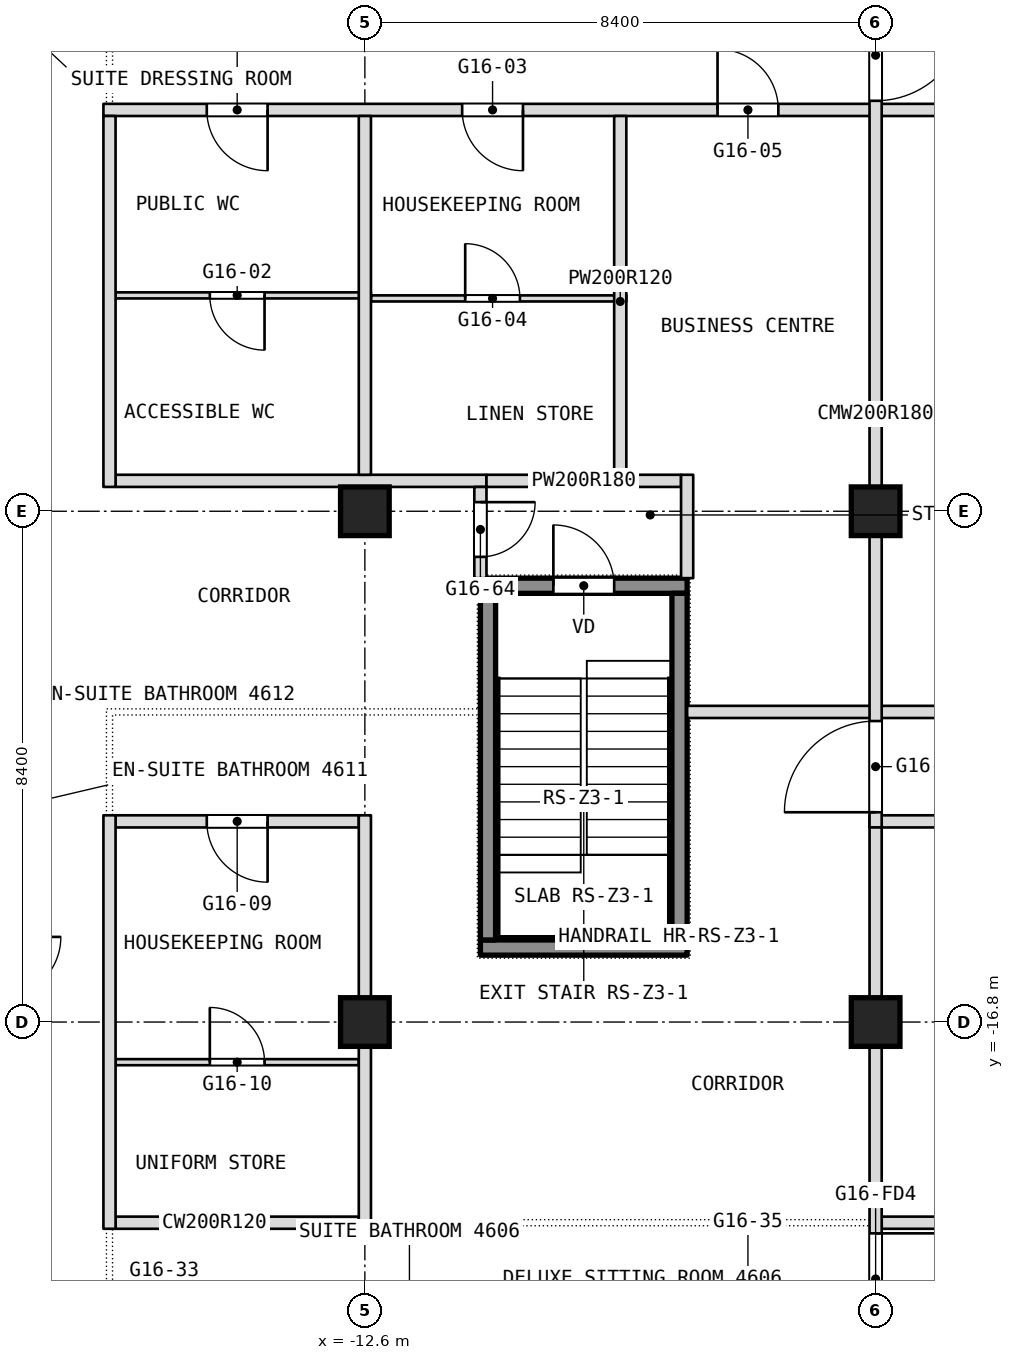
"""IFC4 building model, lengths in metres.
Left out: names, types, materials, properties, quantities, classifications, styles, units other than length and angle.
Written with IfcOpenShell. Run it as: python <this file> out.ifc"""

import sys

from ifc_helpers import new_model, si_unit, direction, frame, frame_2d, origin, origin_2d, place, context, subcontext, project, spatial, rectangle, extrude, element, fill, save


model = new_model("IFC4")
c1 = context("Model", 3, precision=1e-05, world=origin(), true_north=direction((0.0, 1.0)))
c2 = subcontext(c1, "Body", "Model", "MODEL_VIEW")
j1 = project(units=[si_unit("LENGTHUNIT", "METRE"), si_unit("PLANEANGLEUNIT", "RADIAN")], contexts=[c1])
p1 = place(None, origin())
s1 = spatial("IfcSite", under=j1, at=p1, CompositionType="ELEMENT")
p2 = place(p1, origin())
s2 = spatial("IfcBuilding", under=s1, at=p2, CompositionType="ELEMENT")
p3 = place(p2, frame((0.0, 0.0, 202.1)))
s3 = spatial("IfcBuildingStorey", under=s2, at=p3, CompositionType="ELEMENT", Elevation=202.1)
for number, where, z_axis, x_axis in (
    (1, (-12.6, -16.8, 0.0), (0.0, 0.0, 1.0), (1.0, 0.0, 0.0)),
    (2, (-12.6, -8.4, 0.0), (0.0, 0.0, 1.0), (1.0, 0.0, 0.0)),
    (3, (-4.2, -16.8, 0.0), (0.0, 0.0, 1.0), (1.0, 0.0, 0.0)),
    (4, (-4.2, -8.4, 0.0), (0.0, 0.0, 1.0), (1.0, 0.0, 0.0)),
):
    element("IfcColumn", number, at=place(p3, frame(where, z_axis=z_axis, x_axis=x_axis)), inside=s3, PredefinedType="COLUMN", context=c2, shape_type="SweptSolid", body=[
        extrude(rectangle(XDim=0.8, YDim=0.8, at=origin_2d()), origin(), (0.0, 0.0, 1.0), 3.6),
    ])
p4 = place(p3, frame((-16.7, -20.1, 0.0), z_axis=(0.0, 0.0, 1.0), x_axis=(1.0, 0.0, 0.0)))
e5 = element("IfcWall", 5, at=p4, inside=s3, PredefinedType="PARTITIONING", context=c2, shape_type="SweptSolid", body=[
    extrude(rectangle(XDim=4.0, YDim=0.2, at=frame_2d((2.0, 0.0))), origin(), (0.0, 0.0, 1.0), 3.34),
])
p5 = place(p3, frame((-4.1, -20.1, 0.0), z_axis=(0.0, 0.0, 1.0), x_axis=(1.0, 0.0, 0.0)))
e6 = element("IfcWall", 6, at=p5, inside=s3, PredefinedType="PARTITIONING", context=c2, shape_type="SweptSolid", body=[
    extrude(rectangle(XDim=20.8, YDim=0.2, at=frame_2d((10.4, 0.0))), origin(), (0.0, 0.0, 1.0), 3.34),
])
p6 = place(p3, frame((-16.7, -17.46, 0.0), z_axis=(0.0, 0.0, 1.0), x_axis=(1.0, 0.0, 0.0)))
e7 = element("IfcWall", 7, at=p6, inside=s3, PredefinedType="PARTITIONING", context=c2, shape_type="SweptSolid", body=[
    extrude(rectangle(XDim=4.0, YDim=0.1, at=frame_2d((2.0, 0.0))), origin(), (0.0, 0.0, 1.0), 3.34),
])
p7 = place(p6, frame((1.55, 0.0, 0.0)))
e8 = element("IfcOpeningElement", 8, at=p7, cuts=e7, PredefinedType="OPENING", context=c2, shape_type="SweptSolid", body=[
    extrude(rectangle(XDim=0.9, YDim=2.1, at=frame_2d((0.45, 1.05))), frame((0.0, 0.05, 0.0), z_axis=(0.0, -1.0, 0.0), x_axis=(1.0, 0.0, 0.0)), (0.0, 0.0, 1.0), 0.1),
])
p8 = place(p3, frame((-16.7, -13.5, 0.0), z_axis=(0.0, 0.0, 1.0), x_axis=(1.0, 0.0, 0.0)))
e9 = element("IfcWall", 9, at=p8, inside=s3, PredefinedType="PARTITIONING", context=c2, shape_type="SweptSolid", body=[
    extrude(rectangle(XDim=4.0, YDim=0.2, at=frame_2d((2.0, 0.0))), origin(), (0.0, 0.0, 1.0), 3.34),
])
p9 = place(p8, frame((1.5, 0.0, 0.0)))
e10 = element("IfcOpeningElement", 10, at=p9, cuts=e9, PredefinedType="OPENING", context=c2, shape_type="SweptSolid", body=[
    extrude(rectangle(XDim=1.0, YDim=2.1, at=frame_2d((0.5, 1.05))), frame((0.0, 0.1, 0.0), z_axis=(0.0, -1.0, 0.0), x_axis=(1.0, 0.0, 0.0)), (0.0, 0.0, 1.0), 0.2),
])
p10 = place(p3, frame((-4.3, -13.5, 0.0), z_axis=(0.0, 0.0, 1.0), x_axis=(1.0, 0.0, 0.0)))
e11 = element("IfcWall", 11, at=p10, inside=s3, PredefinedType="PARTITIONING", context=c2, shape_type="SweptSolid", body=[
    extrude(rectangle(XDim=10.0, YDim=0.2, at=frame_2d((5.0, 0.0))), origin(), (0.0, 0.0, 1.0), 3.34),
])
p11 = place(p10, frame((3.4, 0.0, 0.0)))
e12 = element("IfcOpeningElement", 12, at=p11, cuts=e11, PredefinedType="OPENING", context=c2, shape_type="SweptSolid", body=[
    extrude(rectangle(XDim=1.8, YDim=2.1, at=frame_2d((0.9, 1.05))), frame((0.0, 0.1, 0.0), z_axis=(0.0, -1.0, 0.0), x_axis=(1.0, 0.0, 0.0)), (0.0, 0.0, 1.0), 0.2),
])
p12 = place(p10, frame((8.85, 0.0, 0.0)))
e13 = element("IfcOpeningElement", 13, at=p12, cuts=e11, PredefinedType="OPENING", context=c2, shape_type="SweptSolid", body=[
    extrude(rectangle(XDim=1.0, YDim=2.1, at=frame_2d((0.5, 1.05))), frame((0.0, 0.1, 0.0), z_axis=(0.0, -1.0, 0.0), x_axis=(1.0, 0.0, 0.0)), (0.0, 0.0, 1.0), 0.2),
])
p13 = place(p3, frame((-7.3, -11.7, 0.0), z_axis=(0.0, 0.0, 1.0), x_axis=(1.0, 0.0, 0.0)))
e14 = element("IfcWall", 14, at=p13, inside=s3, PredefinedType="PARTITIONING", context=c2, shape_type="SweptSolid", body=[
    extrude(rectangle(XDim=14.6, YDim=0.2, at=frame_2d((7.3, 0.0))), origin(), (0.0, 0.0, 1.0), 3.34),
])
p14 = place(p3, frame((-16.7, -7.9, 0.0), z_axis=(0.0, 0.0, 1.0), x_axis=(1.0, 0.0, 0.0)))
e15 = element("IfcWall", 15, at=p14, inside=s3, PredefinedType="PARTITIONING", context=c2, shape_type="SweptSolid", body=[
    extrude(rectangle(XDim=6.1, YDim=0.2, at=frame_2d((3.05, 0.0))), origin(), (0.0, 0.0, 1.0), 3.34),
])
p15 = place(p3, frame((-10.6, -7.9, 0.0), z_axis=(0.0, 0.0, 1.0), x_axis=(1.0, 0.0, 0.0)))
e16 = element("IfcWall", 16, at=p15, inside=s3, PredefinedType="PARTITIONING", context=c2, shape_type="SweptSolid", body=[
    extrude(rectangle(XDim=3.2, YDim=0.2, at=frame_2d((1.6, 0.0))), origin(), (0.0, 0.0, 1.0), 3.34),
])
p16 = place(p3, frame((-12.5, -4.9, 0.0), z_axis=(0.0, 0.0, 1.0), x_axis=(1.0, 0.0, 0.0)))
e17 = element("IfcWall", 17, at=p16, inside=s3, PredefinedType="PARTITIONING", context=c2, shape_type="SweptSolid", body=[
    extrude(rectangle(XDim=4.2, YDim=0.1, at=frame_2d((2.1, 0.0))), origin(), (0.0, 0.0, 1.0), 3.34),
])
p17 = place(p16, frame((1.55, 0.0, 0.0)))
e18 = element("IfcOpeningElement", 18, at=p17, cuts=e17, PredefinedType="OPENING", context=c2, shape_type="SweptSolid", body=[
    extrude(rectangle(XDim=0.9, YDim=2.1, at=frame_2d((0.45, 1.05))), frame((0.0, 0.05, 0.0), z_axis=(0.0, -1.0, 0.0), x_axis=(1.0, 0.0, 0.0)), (0.0, 0.0, 1.0), 0.1),
])
p18 = place(p3, frame((-16.7, -4.85, 0.0), z_axis=(0.0, 0.0, 1.0), x_axis=(1.0, 0.0, 0.0)))
e19 = element("IfcWall", 19, at=p18, inside=s3, PredefinedType="PARTITIONING", context=c2, shape_type="SweptSolid", body=[
    extrude(rectangle(XDim=4.2, YDim=0.1, at=frame_2d((2.1, 0.0))), origin(), (0.0, 0.0, 1.0), 3.34),
])
p19 = place(p18, frame((1.55, 0.0, 0.0)))
e20 = element("IfcOpeningElement", 20, at=p19, cuts=e19, PredefinedType="OPENING", context=c2, shape_type="SweptSolid", body=[
    extrude(rectangle(XDim=0.9, YDim=2.1, at=frame_2d((0.45, 1.05))), frame((0.0, 0.05, 0.0), z_axis=(0.0, -1.0, 0.0), x_axis=(1.0, 0.0, 0.0)), (0.0, 0.0, 1.0), 0.1),
])
p20 = place(p3, frame((-16.9, -1.8, 0.0), z_axis=(0.0, 0.0, 1.0), x_axis=(1.0, 0.0, 0.0)))
e21 = element("IfcWall", 21, at=p20, inside=s3, PredefinedType="PARTITIONING", context=c2, shape_type="SweptSolid", body=[
    extrude(rectangle(XDim=33.8, YDim=0.2, at=frame_2d((16.9, 0.0))), origin(), (0.0, 0.0, 1.0), 3.34),
])
p21 = place(p20, frame((1.7, 0.0, 0.0)))
e22 = element("IfcOpeningElement", 22, at=p21, cuts=e21, PredefinedType="OPENING", context=c2, shape_type="SweptSolid", body=[
    extrude(rectangle(XDim=1.0, YDim=2.1, at=frame_2d((0.5, 1.05))), frame((0.0, 0.1, 0.0), z_axis=(0.0, -1.0, 0.0), x_axis=(1.0, 0.0, 0.0)), (0.0, 0.0, 1.0), 0.2),
])
p22 = place(p20, frame((5.9, 0.0, 0.0)))
e23 = element("IfcOpeningElement", 23, at=p22, cuts=e21, PredefinedType="OPENING", context=c2, shape_type="SweptSolid", body=[
    extrude(rectangle(XDim=1.0, YDim=2.1, at=frame_2d((0.5, 1.05))), frame((0.0, 0.1, 0.0), z_axis=(0.0, -1.0, 0.0), x_axis=(1.0, 0.0, 0.0)), (0.0, 0.0, 1.0), 0.2),
])
p23 = place(p20, frame((10.1, 0.0, 0.0)))
e24 = element("IfcOpeningElement", 24, at=p23, cuts=e21, PredefinedType="OPENING", context=c2, shape_type="SweptSolid", body=[
    extrude(rectangle(XDim=1.0, YDim=2.1, at=frame_2d((0.5, 1.05))), frame((0.0, 0.1, 0.0), z_axis=(0.0, -1.0, 0.0), x_axis=(1.0, 0.0, 0.0)), (0.0, 0.0, 1.0), 0.2),
])
p24 = place(p20, frame((16.0, 0.0, 0.0)))
e25 = element("IfcOpeningElement", 25, at=p24, cuts=e21, PredefinedType="OPENING", context=c2, shape_type="SweptSolid", body=[
    extrude(rectangle(XDim=1.8, YDim=2.1, at=frame_2d((0.9, 1.05))), frame((0.0, 0.1, 0.0), z_axis=(0.0, -1.0, 0.0), x_axis=(1.0, 0.0, 0.0)), (0.0, 0.0, 1.0), 0.2),
])
p25 = place(p20, frame((24.4, 0.0, 0.0)))
e26 = element("IfcOpeningElement", 26, at=p25, cuts=e21, PredefinedType="OPENING", context=c2, shape_type="SweptSolid", body=[
    extrude(rectangle(XDim=1.8, YDim=2.1, at=frame_2d((0.9, 1.05))), frame((0.0, 0.1, 0.0), z_axis=(0.0, -1.0, 0.0), x_axis=(1.0, 0.0, 0.0)), (0.0, 0.0, 1.0), 0.2),
])
p26 = place(p20, frame((31.1, 0.0, 0.0)))
e27 = element("IfcOpeningElement", 27, at=p26, cuts=e21, PredefinedType="OPENING", context=c2, shape_type="SweptSolid", body=[
    extrude(rectangle(XDim=1.0, YDim=2.1, at=frame_2d((0.5, 1.05))), frame((0.0, 0.1, 0.0), z_axis=(0.0, -1.0, 0.0), x_axis=(1.0, 0.0, 0.0)), (0.0, 0.0, 1.0), 0.2),
])
p27 = place(p3, frame((-4.2, -13.6, 0.0), z_axis=(0.0, 0.0, 1.0), x_axis=(0.0, 1.0, 0.0)))
e28 = element("IfcWall", 28, at=p27, inside=s3, PredefinedType="PARTITIONING", context=c2, shape_type="SweptSolid", body=[
    extrude(rectangle(XDim=13.6, YDim=0.2, at=frame_2d((6.8, 0.0))), origin(), (0.0, 0.0, 1.0), 3.34),
])
p28 = place(p27, frame((11.95, 0.0, 0.0)))
e29 = element("IfcOpeningElement", 29, at=p28, cuts=e28, PredefinedType="OPENING", context=c2, shape_type="SweptSolid", body=[
    extrude(rectangle(XDim=1.5, YDim=2.1, at=frame_2d((0.75, 1.05))), frame((0.0, 0.1, 0.0), z_axis=(0.0, -1.0, 0.0), x_axis=(1.0, 0.0, 0.0)), (0.0, 0.0, 1.0), 0.2),
])
p29 = place(p27, frame((0.25, 0.0, 0.0)))
e30 = element("IfcOpeningElement", 30, at=p29, cuts=e28, PredefinedType="OPENING", context=c2, shape_type="SweptSolid", body=[
    extrude(rectangle(XDim=1.5, YDim=2.1, at=frame_2d((0.75, 1.05))), frame((0.0, 0.1, 0.0), z_axis=(0.0, -1.0, 0.0), x_axis=(1.0, 0.0, 0.0)), (0.0, 0.0, 1.0), 0.2),
])
p30 = place(p3, frame((-4.2, -22.0, 0.0), z_axis=(0.0, 0.0, 1.0), x_axis=(0.0, 1.0, 0.0)))
e31 = element("IfcWall", 31, at=p30, inside=s3, PredefinedType="PARTITIONING", context=c2, shape_type="SweptSolid", body=[
    extrude(rectangle(XDim=8.4, YDim=0.2, at=frame_2d((4.2, 0.0))), origin(), (0.0, 0.0, 1.0), 3.34),
])
p31 = place(p30, frame((0.225, 0.0, 0.0)))
e32 = element("IfcOpeningElement", 32, at=p31, cuts=e31, PredefinedType="OPENING", context=c2, shape_type="SweptSolid", body=[
    extrude(rectangle(XDim=1.5, YDim=2.1, at=frame_2d((0.75, 1.05))), frame((0.0, 0.1, 0.0), z_axis=(0.0, -1.0, 0.0), x_axis=(1.0, 0.0, 0.0)), (0.0, 0.0, 1.0), 0.2),
])
p32 = place(p3, frame((-7.3, -9.5, 0.0), z_axis=(0.0, 0.0, 1.0), x_axis=(0.0, 1.0, 0.0)))
e33 = element("IfcWall", 33, at=p32, inside=s3, PredefinedType="PARTITIONING", context=c2, shape_type="SweptSolid", body=[
    extrude(rectangle(XDim=1.7, YDim=0.2, at=frame_2d((0.85, 0.0))), origin(), (0.0, 0.0, 1.0), 3.34),
])
p33 = place(p3, frame((-8.4, -8.0, 0.0), z_axis=(0.0, 0.0, 1.0), x_axis=(0.0, 1.0, 0.0)))
e34 = element("IfcWall", 34, at=p33, inside=s3, PredefinedType="PARTITIONING", context=c2, shape_type="SweptSolid", body=[
    extrude(rectangle(XDim=6.1, YDim=0.2, at=frame_2d((3.05, 0.0))), origin(), (0.0, 0.0, 1.0), 3.34),
])
p34 = place(p3, frame((-10.7, -9.5, 0.0), z_axis=(0.0, 0.0, 1.0), x_axis=(0.0, 1.0, 0.0)))
e35 = element("IfcWall", 35, at=p34, inside=s3, PredefinedType="PARTITIONING", context=c2, shape_type="SweptSolid", body=[
    extrude(rectangle(XDim=1.5, YDim=0.2, at=frame_2d((0.75, 0.0))), origin(), (0.0, 0.0, 1.0), 3.34),
])
p35 = place(p34, frame((0.35, 0.0, 0.0)))
e36 = element("IfcOpeningElement", 36, at=p35, cuts=e35, PredefinedType="OPENING", context=c2, shape_type="SweptSolid", body=[
    extrude(rectangle(XDim=0.9, YDim=2.1, at=frame_2d((0.45, 1.05))), frame((0.0, 0.1, 0.0), z_axis=(0.0, -1.0, 0.0), x_axis=(1.0, 0.0, 0.0)), (0.0, 0.0, 1.0), 0.2),
])
p36 = place(p3, frame((-12.6, -7.8, 0.0), z_axis=(0.0, 0.0, 1.0), x_axis=(0.0, 1.0, 0.0)))
e37 = element("IfcWall", 37, at=p36, inside=s3, PredefinedType="PARTITIONING", context=c2, shape_type="SweptSolid", body=[
    extrude(rectangle(XDim=5.9, YDim=0.2, at=frame_2d((2.95, 0.0))), origin(), (0.0, 0.0, 1.0), 3.34),
])
for number, where, z_axis, x_axis in (
    (38, (-12.6, -20.2, 0.0), (0.0, 0.0, 1.0), (0.0, 1.0, 0.0)),
    (39, (-16.8, -20.2, 0.0), (0.0, 0.0, 1.0), (0.0, 1.0, 0.0)),
):
    element("IfcWall", number, at=place(p3, frame(where, z_axis=z_axis, x_axis=x_axis)), inside=s3, PredefinedType="PARTITIONING", context=c2, shape_type="SweptSolid", body=[
        extrude(rectangle(XDim=6.8, YDim=0.2, at=frame_2d((3.4, 0.0))), origin(), (0.0, 0.0, 1.0), 3.34),
    ])
p37 = place(p3, frame((-16.8, -8.0, 0.0), z_axis=(0.0, 0.0, 1.0), x_axis=(0.0, 1.0, 0.0)))
e40 = element("IfcWall", 40, at=p37, inside=s3, PredefinedType="PARTITIONING", context=c2, shape_type="SweptSolid", body=[
    extrude(rectangle(XDim=6.1, YDim=0.2, at=frame_2d((3.05, 0.0))), origin(), (0.0, 0.0, 1.0), 3.34),
])
p38 = place(p3, frame((-10.7, -15.575, 0.1), z_axis=(0.0, 0.0, 1.0), x_axis=(1.0, 0.0, 0.0)))
e41 = element("IfcWall", 41, at=p38, inside=s3, PredefinedType="SHEAR", context=c2, shape_type="SweptSolid", body=[
    extrude(rectangle(XDim=3.4, YDim=0.25, at=frame_2d((1.7, 0.0))), origin(), (0.0, 0.0, 1.0), 3.6),
])
p39 = place(p3, frame((-10.7, -9.625, 0.1), z_axis=(0.0, 0.0, 1.0), x_axis=(1.0, 0.0, 0.0)))
e42 = element("IfcWall", 42, at=p39, inside=s3, PredefinedType="SHEAR", context=c2, shape_type="SweptSolid", body=[
    extrude(rectangle(XDim=3.4, YDim=0.25, at=frame_2d((1.7, 0.0))), origin(), (0.0, 0.0, 1.0), 3.6),
])
p40 = place(p39, frame((1.2, 0.0, 0.0)))
e43 = element("IfcOpeningElement", 43, at=p40, cuts=e42, PredefinedType="OPENING", context=c2, shape_type="SweptSolid", body=[
    extrude(rectangle(XDim=1.0, YDim=2.1, at=frame_2d((0.5, 1.05))), frame((0.0, 0.125, 0.0), z_axis=(0.0, -1.0, 0.0), x_axis=(1.0, 0.0, 0.0)), (0.0, 0.0, 1.0), 0.25),
])
for number, where, z_axis, x_axis in (
    (44, (-10.575, -15.45, 0.1), (0.0, 0.0, 1.0), (0.0, 1.0, 0.0)),
    (45, (-7.425, -15.45, 0.1), (0.0, 0.0, 1.0), (0.0, 1.0, 0.0)),
):
    element("IfcWall", number, at=place(p3, frame(where, z_axis=z_axis, x_axis=x_axis)), inside=s3, PredefinedType="SHEAR", context=c2, shape_type="SweptSolid", body=[
        extrude(rectangle(XDim=5.7, YDim=0.25, at=frame_2d((2.85, 0.0))), origin(), (0.0, 0.0, 1.0), 3.6),
    ])
p41 = place(p7, origin())
e46 = element("IfcDoor", 46, at=p41, inside=s3, OperationType="SINGLE_SWING_LEFT", PredefinedType="DOOR", context=c2, shape_type="SweptSolid", body=[
    extrude(rectangle(XDim=0.9, YDim=2.1, at=frame_2d((0.45, 1.05))), frame((0.0, 0.025, 0.0), z_axis=(0.0, -1.0, 0.0), x_axis=(1.0, 0.0, 0.0)), (0.0, 0.0, 1.0), 0.05),
])
fill(e8, e46)
p42 = place(p9, origin())
e47 = element("IfcDoor", 47, at=p42, inside=s3, OperationType="SINGLE_SWING_LEFT", PredefinedType="DOOR", context=c2, shape_type="SweptSolid", body=[
    extrude(rectangle(XDim=1.0, YDim=2.1, at=frame_2d((0.5, 1.05))), frame((0.0, 0.025, 0.0), z_axis=(0.0, -1.0, 0.0), x_axis=(1.0, 0.0, 0.0)), (0.0, 0.0, 1.0), 0.05),
])
fill(e10, e47)
p43 = place(p17, origin())
e48 = element("IfcDoor", 48, at=p43, inside=s3, OperationType="SINGLE_SWING_RIGHT", PredefinedType="DOOR", context=c2, shape_type="SweptSolid", body=[
    extrude(rectangle(XDim=0.9, YDim=2.1, at=frame_2d((0.45, 1.05))), frame((0.0, 0.025, 0.0), z_axis=(0.0, -1.0, 0.0), x_axis=(1.0, 0.0, 0.0)), (0.0, 0.0, 1.0), 0.05),
])
fill(e18, e48)
p44 = place(p19, origin())
e49 = element("IfcDoor", 49, at=p44, inside=s3, OperationType="SINGLE_SWING_RIGHT", PredefinedType="DOOR", context=c2, shape_type="SweptSolid", body=[
    extrude(rectangle(XDim=0.9, YDim=2.1, at=frame_2d((0.45, 1.05))), frame((0.0, 0.025, 0.0), z_axis=(0.0, -1.0, 0.0), x_axis=(1.0, 0.0, 0.0)), (0.0, 0.0, 1.0), 0.05),
])
fill(e20, e49)
p45 = place(p21, origin())
e50 = element("IfcDoor", 50, at=p45, inside=s3, OperationType="SINGLE_SWING_LEFT", PredefinedType="DOOR", context=c2, shape_type="SweptSolid", body=[
    extrude(rectangle(XDim=1.0, YDim=2.1, at=frame_2d((0.5, 1.05))), frame((0.0, 0.025, 0.0), z_axis=(0.0, -1.0, 0.0), x_axis=(1.0, 0.0, 0.0)), (0.0, 0.0, 1.0), 0.05),
])
fill(e22, e50)
p46 = place(p22, origin())
e51 = element("IfcDoor", 51, at=p46, inside=s3, OperationType="SINGLE_SWING_LEFT", PredefinedType="DOOR", context=c2, shape_type="SweptSolid", body=[
    extrude(rectangle(XDim=1.0, YDim=2.1, at=frame_2d((0.5, 1.05))), frame((0.0, 0.025, 0.0), z_axis=(0.0, -1.0, 0.0), x_axis=(1.0, 0.0, 0.0)), (0.0, 0.0, 1.0), 0.05),
])
fill(e23, e51)
p47 = place(p23, origin())
e52 = element("IfcDoor", 52, at=p47, inside=s3, OperationType="SINGLE_SWING_RIGHT", PredefinedType="DOOR", context=c2, shape_type="SweptSolid", body=[
    extrude(rectangle(XDim=1.0, YDim=2.1, at=frame_2d((0.5, 1.05))), frame((0.0, 0.025, 0.0), z_axis=(0.0, -1.0, 0.0), x_axis=(1.0, 0.0, 0.0)), (0.0, 0.0, 1.0), 0.05),
])
fill(e24, e52)
p48 = place(p35, origin())
e53 = element("IfcDoor", 53, at=p48, inside=s3, OperationType="SINGLE_SWING_LEFT", PredefinedType="DOOR", context=c2, shape_type="SweptSolid", body=[
    extrude(rectangle(XDim=0.9, YDim=2.1, at=frame_2d((0.45, 1.05))), frame((0.0, 0.025, 0.0), z_axis=(0.0, -1.0, 0.0), x_axis=(1.0, 0.0, 0.0)), (0.0, 0.0, 1.0), 0.05),
])
fill(e36, e53)
p49 = place(p40, origin())
e54 = element("IfcDoor", 54, at=p49, inside=s3, OperationType="SINGLE_SWING_LEFT", PredefinedType="DOOR", context=c2, shape_type="SweptSolid", body=[
    extrude(rectangle(XDim=1.0, YDim=2.1, at=frame_2d((0.5, 1.05))), frame((0.0, 0.025, 0.0), z_axis=(0.0, -1.0, 0.0), x_axis=(1.0, 0.0, 0.0)), (0.0, 0.0, 1.0), 0.05),
])
fill(e43, e54)
p50 = place(p28, origin())
e55 = element("IfcDoor", 55, at=p50, inside=s3, OperationType="DOUBLE_DOOR_DOUBLE_SWING", PredefinedType="DOOR", context=c2, shape_type="SweptSolid", body=[
    extrude(rectangle(XDim=1.5, YDim=2.1, at=frame_2d((0.75, 1.05))), frame((0.0, 0.025, 0.0), z_axis=(0.0, -1.0, 0.0), x_axis=(1.0, 0.0, 0.0)), (0.0, 0.0, 1.0), 0.05),
])
fill(e29, e55)
p51 = place(p29, origin())
e56 = element("IfcDoor", 56, at=p51, inside=s3, OperationType="DOUBLE_DOOR_DOUBLE_SWING", PredefinedType="DOOR", context=c2, shape_type="SweptSolid", body=[
    extrude(rectangle(XDim=1.5, YDim=2.1, at=frame_2d((0.75, 1.05))), frame((0.0, 0.025, 0.0), z_axis=(0.0, -1.0, 0.0), x_axis=(1.0, 0.0, 0.0)), (0.0, 0.0, 1.0), 0.05),
])
fill(e30, e56)
p52 = place(p31, origin())
e57 = element("IfcDoor", 57, at=p52, inside=s3, OperationType="DOUBLE_DOOR_DOUBLE_SWING", PredefinedType="DOOR", context=c2, shape_type="SweptSolid", body=[
    extrude(rectangle(XDim=1.5, YDim=2.1, at=frame_2d((0.75, 1.05))), frame((0.0, 0.025, 0.0), z_axis=(0.0, -1.0, 0.0), x_axis=(1.0, 0.0, 0.0)), (0.0, 0.0, 1.0), 0.05),
])
fill(e32, e57)
save(model, sys.argv[1])
